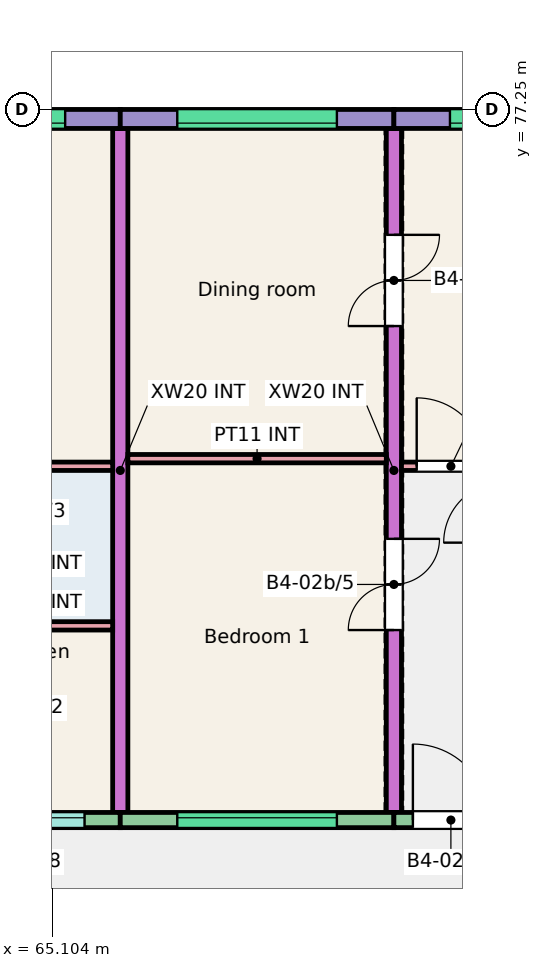
"""IFC4 building model, lengths in metres.
Left out: names, types, materials, properties, quantities, classifications, styles, units other than length and angle.
Written with IfcOpenShell. Run it as: python <this file> out.ifc"""

import sys

from ifc_helpers import new_model, si_unit, direction, frame, frame_2d, origin, place, context, subcontext, project, spatial, rectangle, extrude, element, fill, save


model = new_model("IFC4")
c1 = context("Model", 3, precision=1e-05, world=origin(), true_north=direction((0.0, 1.0)))
c2 = subcontext(c1, "Body", "Model", "MODEL_VIEW")
j1 = project(units=[si_unit("LENGTHUNIT", "METRE"), si_unit("PLANEANGLEUNIT", "RADIAN")], contexts=[c1])
p1 = place(None, origin())
s1 = spatial("IfcSite", under=j1, at=p1, CompositionType="ELEMENT")
p2 = place(p1, origin())
s2 = spatial("IfcBuilding", under=s1, at=p2, CompositionType="ELEMENT")
p3 = place(p2, frame((0.0, 0.0, 6.0)))
s3 = spatial("IfcBuildingStorey", under=s2, at=p3, CompositionType="ELEMENT", Elevation=6.0)
p4 = place(p3, frame((66.0, 68.0, 0.0), z_axis=(0.0, 0.0, 1.0), x_axis=(0.0, 1.0, 0.0)))
e1 = element("IfcWall", 1, at=p4, inside=s3, PredefinedType="SHEAR", context=c2, shape_type="SweptSolid", body=[
    extrude(rectangle(XDim=9.0, YDim=0.2, at=frame_2d((4.5, 0.0))), origin(), (0.0, 0.0, 1.0), 3.0),
])
p5 = place(p3, frame((69.6, 68.0, 0.0), z_axis=(0.0, 0.0, 1.0), x_axis=(0.0, 1.0, 0.0)))
e2 = element("IfcWall", 2, at=p5, inside=s3, PredefinedType="SHEAR", context=c2, shape_type="SweptSolid", body=[
    extrude(rectangle(XDim=9.0, YDim=0.2, at=frame_2d((4.5, 0.0))), origin(), (0.0, 0.0, 1.0), 3.0),
])
p6 = place(p5, frame((2.4, 0.0, 0.0)))
e3 = element("IfcOpeningElement", 3, at=p6, cuts=e2, PredefinedType="OPENING", context=c2, shape_type="SweptSolid", body=[
    extrude(rectangle(XDim=1.2, YDim=2.1, at=frame_2d((0.6, 1.05))), frame((0.0, 0.11, 0.0), z_axis=(0.0, -1.0, 0.0), x_axis=(1.0, 0.0, 0.0)), (0.0, 0.0, 1.0), 0.22),
])
p7 = place(p5, frame((6.4, 0.0, 0.0)))
e4 = element("IfcOpeningElement", 4, at=p7, cuts=e2, PredefinedType="OPENING", context=c2, shape_type="SweptSolid", body=[
    extrude(rectangle(XDim=1.2, YDim=2.1, at=frame_2d((0.6, 1.05))), frame((0.0, 0.11, 0.0), z_axis=(0.0, -1.0, 0.0), x_axis=(1.0, 0.0, 0.0)), (0.0, 0.0, 1.0), 0.22),
])
p8 = place(p3, frame((62.4, 77.125, 0.0), z_axis=(0.0, 0.0, 1.0), x_axis=(1.0, 0.0, 0.0)))
e5 = element("IfcWall", 5, at=p8, inside=s3, PredefinedType="SOLIDWALL", context=c2, shape_type="SweptSolid", body=[
    extrude(rectangle(XDim=3.6, YDim=0.25, at=frame_2d((1.8, 0.0))), origin(), (0.0, 0.0, 1.0), 3.0),
])
p9 = place(p8, frame((0.775, 0.0, 1.2)))
e6 = element("IfcOpeningElement", 6, at=p9, cuts=e5, PredefinedType="OPENING", context=c2, shape_type="SweptSolid", body=[
    extrude(rectangle(XDim=2.1, YDim=1.2, at=frame_2d((1.05, 0.6))), frame((0.0, 0.135, 0.0), z_axis=(0.0, -1.0, 0.0), x_axis=(1.0, 0.0, 0.0)), (0.0, 0.0, 1.0), 0.27),
])
p10 = place(p3, frame((62.55, 67.9, 0.0), z_axis=(0.0, 0.0, 1.0), x_axis=(1.0, 0.0, 0.0)))
e7 = element("IfcWall", 7, at=p10, inside=s3, PredefinedType="SOLIDWALL", context=c2, shape_type="SweptSolid", body=[
    extrude(rectangle(XDim=3.45, YDim=0.2, at=frame_2d((1.725, 0.0))), origin(), (0.0, 0.0, 1.0), 3.0),
])
p11 = place(p10, frame((1.78, 0.0, 1.1)))
e8 = element("IfcOpeningElement", 8, at=p11, cuts=e7, PredefinedType="OPENING", context=c2, shape_type="SweptSolid", body=[
    extrude(rectangle(XDim=1.2, YDim=1.3, at=frame_2d((0.6, 0.65))), frame((0.0, 0.11, 0.0), z_axis=(0.0, -1.0, 0.0), x_axis=(1.0, 0.0, 0.0)), (0.0, 0.0, 1.0), 0.22),
])
p12 = place(p10, frame((0.15, 0.0, 0.0)))
e9 = element("IfcOpeningElement", 9, at=p12, cuts=e7, PredefinedType="OPENING", context=c2, shape_type="SweptSolid", body=[
    extrude(rectangle(XDim=1.0, YDim=2.1, at=frame_2d((0.5, 1.05))), frame((0.0, 0.11, 0.0), z_axis=(0.0, -1.0, 0.0), x_axis=(1.0, 0.0, 0.0)), (0.0, 0.0, 1.0), 0.22),
])
p13 = place(p3, frame((66.0, 77.125, 0.0), z_axis=(0.0, 0.0, 1.0), x_axis=(1.0, 0.0, 0.0)))
e10 = element("IfcWall", 10, at=p13, inside=s3, PredefinedType="SOLIDWALL", context=c2, shape_type="SweptSolid", body=[
    extrude(rectangle(XDim=3.6, YDim=0.25, at=frame_2d((1.8, 0.0))), origin(), (0.0, 0.0, 1.0), 3.0),
])
p14 = place(p13, frame((0.75, 0.0, 1.2)))
e11 = element("IfcOpeningElement", 11, at=p14, cuts=e10, PredefinedType="OPENING", context=c2, shape_type="SweptSolid", body=[
    extrude(rectangle(XDim=2.1, YDim=1.2, at=frame_2d((1.05, 0.6))), frame((0.0, 0.135, 0.0), z_axis=(0.0, -1.0, 0.0), x_axis=(1.0, 0.0, 0.0)), (0.0, 0.0, 1.0), 0.27),
])
p15 = place(p3, frame((66.0, 67.9, 0.0), z_axis=(0.0, 0.0, 1.0), x_axis=(1.0, 0.0, 0.0)))
e12 = element("IfcWall", 12, at=p15, inside=s3, PredefinedType="SOLIDWALL", context=c2, shape_type="SweptSolid", body=[
    extrude(rectangle(XDim=3.6, YDim=0.2, at=frame_2d((1.8, 0.0))), origin(), (0.0, 0.0, 1.0), 3.0),
])
p16 = place(p15, frame((0.75, 0.0, 1.2)))
e13 = element("IfcOpeningElement", 13, at=p16, cuts=e12, PredefinedType="OPENING", context=c2, shape_type="SweptSolid", body=[
    extrude(rectangle(XDim=2.1, YDim=1.2, at=frame_2d((1.05, 0.6))), frame((0.0, 0.11, 0.0), z_axis=(0.0, -1.0, 0.0), x_axis=(1.0, 0.0, 0.0)), (0.0, 0.0, 1.0), 0.22),
])
p17 = place(p3, frame((69.6, 77.125, 0.0), z_axis=(0.0, 0.0, 1.0), x_axis=(1.0, 0.0, 0.0)))
e14 = element("IfcWall", 14, at=p17, inside=s3, PredefinedType="SOLIDWALL", context=c2, shape_type="SweptSolid", body=[
    extrude(rectangle(XDim=3.6, YDim=0.25, at=frame_2d((1.8, 0.0))), origin(), (0.0, 0.0, 1.0), 3.0),
])
p18 = place(p17, frame((0.738, 0.0, 1.2)))
e15 = element("IfcOpeningElement", 15, at=p18, cuts=e14, PredefinedType="OPENING", context=c2, shape_type="SweptSolid", body=[
    extrude(rectangle(XDim=2.1, YDim=1.2, at=frame_2d((1.05, 0.6))), frame((0.0, 0.135, 0.0), z_axis=(0.0, -1.0, 0.0), x_axis=(1.0, 0.0, 0.0)), (0.0, 0.0, 1.0), 0.27),
])
p19 = place(p3, frame((69.6, 67.9, 0.0), z_axis=(0.0, 0.0, 1.0), x_axis=(1.0, 0.0, 0.0)))
e16 = element("IfcWall", 16, at=p19, inside=s3, PredefinedType="SOLIDWALL", context=c2, shape_type="SweptSolid", body=[
    extrude(rectangle(XDim=3.6, YDim=0.2, at=frame_2d((1.8, 0.0))), origin(), (0.0, 0.0, 1.0), 3.0),
])
p20 = place(p19, frame((1.893, 0.0, 1.1)))
e17 = element("IfcOpeningElement", 17, at=p20, cuts=e16, PredefinedType="OPENING", context=c2, shape_type="SweptSolid", body=[
    extrude(rectangle(XDim=1.2, YDim=1.3, at=frame_2d((0.6, 0.65))), frame((0.0, 0.11, 0.0), z_axis=(0.0, -1.0, 0.0), x_axis=(1.0, 0.0, 0.0)), (0.0, 0.0, 1.0), 0.22),
])
p21 = place(p19, frame((0.25, 0.0, 0.0)))
e18 = element("IfcOpeningElement", 18, at=p21, cuts=e16, PredefinedType="OPENING", context=c2, shape_type="SweptSolid", body=[
    extrude(rectangle(XDim=1.0, YDim=2.1, at=frame_2d((0.5, 1.05))), frame((0.0, 0.11, 0.0), z_axis=(0.0, -1.0, 0.0), x_axis=(1.0, 0.0, 0.0)), (0.0, 0.0, 1.0), 0.22),
])
p22 = place(p3, frame((63.96, 70.455, 0.0), z_axis=(0.0, 0.0, 1.0), x_axis=(1.0, 0.0, 0.0)))
e19 = element("IfcWall", 19, at=p22, inside=s3, PredefinedType="PARTITIONING", context=c2, shape_type="SweptSolid", body=[
    extrude(rectangle(XDim=1.94, YDim=0.11, at=frame_2d((0.97, 0.0))), origin(), (0.0, 0.0, 1.0), 2.8),
])
p23 = place(p3, frame((62.55, 72.555, 0.0), z_axis=(0.0, 0.0, 1.0), x_axis=(1.0, 0.0, 0.0)))
e20 = element("IfcWall", 20, at=p23, inside=s3, PredefinedType="PARTITIONING", context=c2, shape_type="SweptSolid", body=[
    extrude(rectangle(XDim=3.35, YDim=0.11, at=frame_2d((1.675, 0.0))), origin(), (0.0, 0.0, 1.0), 2.8),
])
p24 = place(p23, frame((0.2, 0.0, 0.0)))
e21 = element("IfcOpeningElement", 21, at=p24, cuts=e20, PredefinedType="OPENING", context=c2, shape_type="SweptSolid", body=[
    extrude(rectangle(XDim=0.9, YDim=2.1, at=frame_2d((0.45, 1.05))), frame((0.0, 0.065, 0.0), z_axis=(0.0, -1.0, 0.0), x_axis=(1.0, 0.0, 0.0)), (0.0, 0.0, 1.0), 0.13),
])
p25 = place(p3, frame((69.7, 72.555, 0.0), z_axis=(0.0, 0.0, 1.0), x_axis=(1.0, 0.0, 0.0)))
e22 = element("IfcWall", 22, at=p25, inside=s3, PredefinedType="PARTITIONING", context=c2, shape_type="SweptSolid", body=[
    extrude(rectangle(XDim=3.375, YDim=0.11, at=frame_2d((1.688, 0.0))), origin(), (0.0, 0.0, 1.0), 2.8),
])
p26 = place(p25, frame((0.2, 0.0, 0.0)))
e23 = element("IfcOpeningElement", 23, at=p26, cuts=e22, PredefinedType="OPENING", context=c2, shape_type="SweptSolid", body=[
    extrude(rectangle(XDim=0.9, YDim=2.1, at=frame_2d((0.45, 1.05))), frame((0.0, 0.065, 0.0), z_axis=(0.0, -1.0, 0.0), x_axis=(1.0, 0.0, 0.0)), (0.0, 0.0, 1.0), 0.13),
])
p27 = place(p3, frame((66.1, 72.655, 0.0), z_axis=(0.0, 0.0, 1.0), x_axis=(1.0, 0.0, 0.0)))
e24 = element("IfcWall", 24, at=p27, inside=s3, PredefinedType="PARTITIONING", context=c2, shape_type="SweptSolid", body=[
    extrude(rectangle(XDim=3.4, YDim=0.11, at=frame_2d((1.7, 0.0))), origin(), (0.0, 0.0, 1.0), 2.8),
])
p28 = place(p11, origin())
e25 = element("IfcWindow", 25, at=p28, inside=s3, PartitioningType="SINGLE_PANEL", PredefinedType="WINDOW", context=c2, shape_type="SweptSolid", body=[
    extrude(rectangle(XDim=1.2, YDim=1.3, at=frame_2d((0.6, 0.65))), frame((0.0, 0.06, 0.0), z_axis=(0.0, -1.0, 0.0), x_axis=(1.0, 0.0, 0.0)), (0.0, 0.0, 1.0), 0.06),
])
fill(e8, e25)
p29 = place(p9, origin())
e26 = element("IfcWindow", 26, at=p29, inside=s3, PartitioningType="SINGLE_PANEL", PredefinedType="WINDOW", context=c2, shape_type="SweptSolid", body=[
    extrude(rectangle(XDim=2.1, YDim=1.2, at=frame_2d((1.05, 0.6))), frame((0.0, -0.025, 0.0), z_axis=(0.0, -1.0, 0.0), x_axis=(1.0, 0.0, 0.0)), (0.0, 0.0, 1.0), 0.06),
])
fill(e6, e26)
p30 = place(p16, origin())
e27 = element("IfcWindow", 27, at=p30, inside=s3, PartitioningType="SINGLE_PANEL", PredefinedType="WINDOW", context=c2, shape_type="SweptSolid", body=[
    extrude(rectangle(XDim=2.1, YDim=1.2, at=frame_2d((1.05, 0.6))), frame((0.0, 0.06, 0.0), z_axis=(0.0, -1.0, 0.0), x_axis=(1.0, 0.0, 0.0)), (0.0, 0.0, 1.0), 0.06),
])
fill(e13, e27)
p31 = place(p14, origin())
e28 = element("IfcWindow", 28, at=p31, inside=s3, PartitioningType="SINGLE_PANEL", PredefinedType="WINDOW", context=c2, shape_type="SweptSolid", body=[
    extrude(rectangle(XDim=2.1, YDim=1.2, at=frame_2d((1.05, 0.6))), frame((0.0, -0.025, 0.0), z_axis=(0.0, -1.0, 0.0), x_axis=(1.0, 0.0, 0.0)), (0.0, 0.0, 1.0), 0.06),
])
fill(e11, e28)
p32 = place(p18, origin())
e29 = element("IfcWindow", 29, at=p32, inside=s3, PartitioningType="SINGLE_PANEL", PredefinedType="WINDOW", context=c2, shape_type="SweptSolid", body=[
    extrude(rectangle(XDim=2.1, YDim=1.2, at=frame_2d((1.05, 0.6))), frame((0.0, -0.025, 0.0), z_axis=(0.0, -1.0, 0.0), x_axis=(1.0, 0.0, 0.0)), (0.0, 0.0, 1.0), 0.06),
])
fill(e15, e29)
p33 = place(p21, origin())
e30 = element("IfcDoor", 30, at=p33, inside=s3, OperationType="SINGLE_SWING_LEFT", PredefinedType="DOOR", context=c2, shape_type="SweptSolid", body=[
    extrude(rectangle(XDim=1.0, YDim=2.1, at=frame_2d((0.5, 1.05))), frame((0.0, 0.025, 0.0), z_axis=(0.0, -1.0, 0.0), x_axis=(1.0, 0.0, 0.0)), (0.0, 0.0, 1.0), 0.05),
])
fill(e18, e30)
p34 = place(p26, origin())
e31 = element("IfcDoor", 31, at=p34, inside=s3, OperationType="SINGLE_SWING_LEFT", PredefinedType="DOOR", context=c2, shape_type="SweptSolid", body=[
    extrude(rectangle(XDim=0.9, YDim=2.1, at=frame_2d((0.45, 1.05))), frame((0.0, 0.025, 0.0), z_axis=(0.0, -1.0, 0.0), x_axis=(1.0, 0.0, 0.0)), (0.0, 0.0, 1.0), 0.05),
])
fill(e23, e31)
p35 = place(p6, origin())
e32 = element("IfcDoor", 32, at=p35, inside=s3, OperationType="DOUBLE_DOOR_SINGLE_SWING", PredefinedType="DOOR", context=c2, shape_type="SweptSolid", body=[
    extrude(rectangle(XDim=1.2, YDim=2.1, at=frame_2d((0.6, 1.05))), frame((0.0, 0.025, 0.0), z_axis=(0.0, -1.0, 0.0), x_axis=(1.0, 0.0, 0.0)), (0.0, 0.0, 1.0), 0.05),
])
fill(e3, e32)
p36 = place(p7, origin())
e33 = element("IfcDoor", 33, at=p36, inside=s3, OperationType="DOUBLE_DOOR_SINGLE_SWING", PredefinedType="DOOR", context=c2, shape_type="SweptSolid", body=[
    extrude(rectangle(XDim=1.2, YDim=2.1, at=frame_2d((0.6, 1.05))), frame((0.0, 0.025, 0.0), z_axis=(0.0, -1.0, 0.0), x_axis=(1.0, 0.0, 0.0)), (0.0, 0.0, 1.0), 0.05),
])
fill(e4, e33)
save(model, sys.argv[1])
